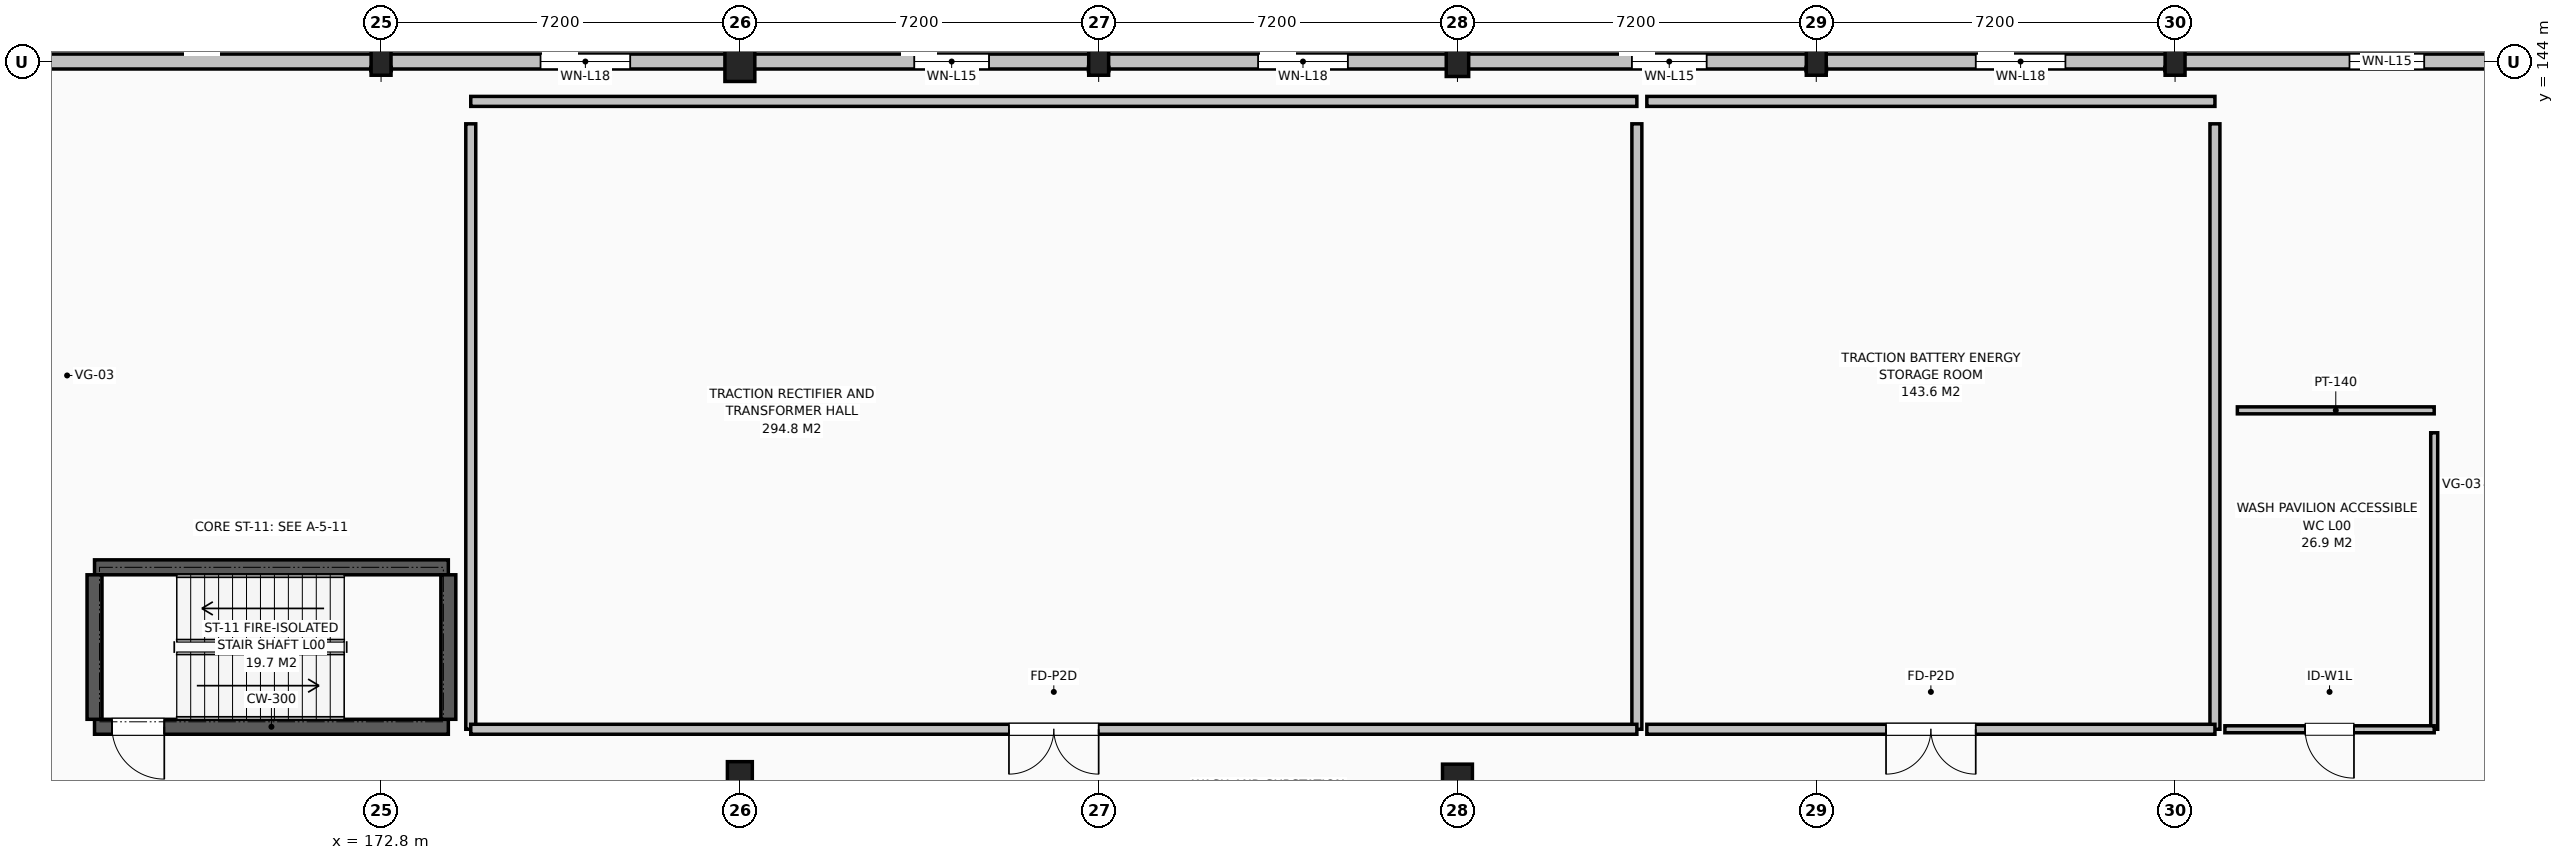
"""IFC4 building model, lengths in metres.
Left out: names, types, materials, properties, quantities, classifications, styles, units other than length and angle.
Written with IfcOpenShell. Run it as: python <this file> out.ifc"""

import sys

from ifc_helpers import new_model, si_unit, direction, frame, frame_2d, origin, origin_2d, place, context, subcontext, project, spatial, rectangle, circle, extrude, element, fill, save


model = new_model("IFC4")
c1 = context("Model", 3, precision=1e-05, world=origin(), true_north=direction((0.0, 1.0)))
c2 = subcontext(c1, "Body", "Model", "MODEL_VIEW")
j1 = project(units=[si_unit("LENGTHUNIT", "METRE"), si_unit("PLANEANGLEUNIT", "RADIAN")], contexts=[c1])
p1 = place(None, origin())
s1 = spatial("IfcSite", under=j1, at=p1, CompositionType="ELEMENT")
p2 = place(p1, origin())
s2 = spatial("IfcBuilding", under=s1, at=p2, CompositionType="ELEMENT")
p3 = place(p2, origin())
s3 = spatial("IfcBuildingStorey", under=s2, at=p3, CompositionType="ELEMENT", Elevation=0.0)
p4 = place(p3, frame((180.0, 129.6, 0.0), z_axis=(0.0, 0.0, 1.0), x_axis=(1.0, 0.0, 0.0)))
e1 = element("IfcColumn", 1, at=p4, inside=s3, PredefinedType="COLUMN", context=c2, shape_type="SweptSolid", body=[
    extrude(rectangle(XDim=0.5, YDim=0.7, at=origin_2d()), origin(), (0.0, 0.0, 1.0), 4.8),
])
p5 = place(p3, frame((180.0, 144.0, 0.0), z_axis=(0.0, 0.0, 1.0), x_axis=(1.0, 0.0, 0.0)))
e2 = element("IfcColumn", 2, at=p5, inside=s3, PredefinedType="COLUMN", context=c2, shape_type="SweptSolid", body=[
    extrude(rectangle(XDim=0.6, YDim=0.8, at=origin_2d()), origin(), (0.0, 0.0, 1.0), 4.8),
])
p6 = place(p3, frame((194.4, 129.6, 0.0), z_axis=(0.0, 0.0, 1.0), x_axis=(1.0, 0.0, 0.0)))
e3 = element("IfcColumn", 3, at=p6, inside=s3, PredefinedType="COLUMN", context=c2, shape_type="SweptSolid", body=[
    extrude(circle(Radius=0.3, at=origin_2d()), origin(), (0.0, 0.0, 1.0), 4.8),
])
p7 = place(p3, frame((194.4, 144.0, 0.0), z_axis=(0.0, 0.0, 1.0), x_axis=(1.0, 0.0, 0.0)))
e4 = element("IfcColumn", 4, at=p7, inside=s3, PredefinedType="COLUMN", context=c2, shape_type="SweptSolid", body=[
    extrude(rectangle(XDim=0.45, YDim=0.6, at=origin_2d()), origin(), (0.0, 0.0, 1.0), 4.8),
])
for number, where, z_axis, x_axis in (
    (5, (172.8, 144.0, 0.0), (0.0, 0.0, 1.0), (1.0, 0.0, 0.0)),
    (6, (187.2, 144.0, 0.0), (0.0, 0.0, 1.0), (1.0, 0.0, 0.0)),
    (7, (201.6, 144.0, 0.0), (0.0, 0.0, 1.0), (1.0, 0.0, 0.0)),
    (8, (208.8, 144.0, 0.0), (0.0, 0.0, 1.0), (1.0, 0.0, 0.0)),
):
    element("IfcColumn", number, at=place(p3, frame(where, z_axis=z_axis, x_axis=x_axis)), inside=s3, PredefinedType="PILASTER", context=c2, shape_type="SweptSolid", body=[
        extrude(rectangle(XDim=0.4, YDim=0.55, at=origin_2d()), origin(), (0.0, 0.0, 1.0), 4.4),
    ])
p8 = place(p3, frame((216.0, 144.0, 0.0), z_axis=(0.0, 0.0, 1.0), x_axis=(-1.0, 0.0, 0.0)))
e9 = element("IfcWall", 9, at=p8, inside=s3, PredefinedType="SOLIDWALL", context=c2, shape_type="SweptSolid", body=[
    extrude(rectangle(XDim=50.4, YDim=0.3, at=frame_2d((25.2, 0.0))), origin(), (0.0, 0.0, 1.0), 4.25),
])
p9 = place(p8, frame((2.2, 0.0, 1.4)))
e10 = element("IfcOpeningElement", 10, at=p9, cuts=e9, PredefinedType="OPENING", context=c2, shape_type="SweptSolid", body=[
    extrude(rectangle(XDim=1.5, YDim=1.15, at=frame_2d((0.75, 0.575))), frame((0.0, 0.16, 0.0), z_axis=(0.0, -1.0, 0.0), x_axis=(1.0, 0.0, 0.0)), (0.0, 0.0, 1.0), 0.32),
])
p10 = place(p8, frame((9.4, 0.0, 1.4)))
e11 = element("IfcOpeningElement", 11, at=p10, cuts=e9, PredefinedType="OPENING", context=c2, shape_type="SweptSolid", body=[
    extrude(rectangle(XDim=1.8, YDim=1.15, at=frame_2d((0.9, 0.575))), frame((0.0, 0.16, 0.0), z_axis=(0.0, -1.0, 0.0), x_axis=(1.0, 0.0, 0.0)), (0.0, 0.0, 1.0), 0.32),
])
p11 = place(p8, frame((16.6, 0.0, 1.4)))
e12 = element("IfcOpeningElement", 12, at=p11, cuts=e9, PredefinedType="OPENING", context=c2, shape_type="SweptSolid", body=[
    extrude(rectangle(XDim=1.5, YDim=1.15, at=frame_2d((0.75, 0.575))), frame((0.0, 0.16, 0.0), z_axis=(0.0, -1.0, 0.0), x_axis=(1.0, 0.0, 0.0)), (0.0, 0.0, 1.0), 0.32),
])
p12 = place(p8, frame((23.8, 0.0, 1.4)))
e13 = element("IfcOpeningElement", 13, at=p12, cuts=e9, PredefinedType="OPENING", context=c2, shape_type="SweptSolid", body=[
    extrude(rectangle(XDim=1.8, YDim=1.15, at=frame_2d((0.9, 0.575))), frame((0.0, 0.16, 0.0), z_axis=(0.0, -1.0, 0.0), x_axis=(1.0, 0.0, 0.0)), (0.0, 0.0, 1.0), 0.32),
])
p13 = place(p8, frame((31.0, 0.0, 1.4)))
e14 = element("IfcOpeningElement", 14, at=p13, cuts=e9, PredefinedType="OPENING", context=c2, shape_type="SweptSolid", body=[
    extrude(rectangle(XDim=1.5, YDim=1.15, at=frame_2d((0.75, 0.575))), frame((0.0, 0.16, 0.0), z_axis=(0.0, -1.0, 0.0), x_axis=(1.0, 0.0, 0.0)), (0.0, 0.0, 1.0), 0.32),
])
p14 = place(p8, frame((38.2, 0.0, 1.4)))
e15 = element("IfcOpeningElement", 15, at=p14, cuts=e9, PredefinedType="OPENING", context=c2, shape_type="SweptSolid", body=[
    extrude(rectangle(XDim=1.8, YDim=1.15, at=frame_2d((0.9, 0.575))), frame((0.0, 0.16, 0.0), z_axis=(0.0, -1.0, 0.0), x_axis=(1.0, 0.0, 0.0)), (0.0, 0.0, 1.0), 0.32),
])
p15 = place(p3, frame((167.05, 130.65, 0.0), z_axis=(0.0, 0.0, 1.0), x_axis=(1.0, 0.0, 0.0)))
e16 = element("IfcWall", 16, at=p15, inside=s3, PredefinedType="SHEAR", context=c2, shape_type="SweptSolid", body=[
    extrude(rectangle(XDim=7.1, YDim=0.3, at=frame_2d((3.55, 0.0))), origin(), (0.0, 0.0, 1.0), 4.525),
])
p16 = place(p15, frame((0.35, 0.0, 0.0)))
e17 = element("IfcOpeningElement", 17, at=p16, cuts=e16, PredefinedType="OPENING", context=c2, shape_type="SweptSolid", body=[
    extrude(rectangle(XDim=1.05, YDim=2.15, at=frame_2d((0.525, 1.075))), frame((0.0, 0.16, 0.0), z_axis=(0.0, -1.0, 0.0), x_axis=(1.0, 0.0, 0.0)), (0.0, 0.0, 1.0), 0.32),
])
p17 = place(p3, frame((174.15, 133.85, 0.0), z_axis=(0.0, 0.0, 1.0), x_axis=(-1.0, 0.0, 0.0)))
e18 = element("IfcWall", 18, at=p17, inside=s3, PredefinedType="SHEAR", context=c2, shape_type="SweptSolid", body=[
    extrude(rectangle(XDim=7.1, YDim=0.3, at=frame_2d((3.55, 0.0))), origin(), (0.0, 0.0, 1.0), 4.525),
])
for number, where, z_axis, x_axis in (
    (19, (174.15, 130.8, 0.0), (0.0, 0.0, 1.0), (0.0, 1.0, 0.0)),
    (20, (167.05, 133.7, 0.0), (0.0, 0.0, 1.0), (0.0, -1.0, 0.0)),
):
    element("IfcWall", number, at=place(p3, frame(where, z_axis=z_axis, x_axis=x_axis)), inside=s3, PredefinedType="SHEAR", context=c2, shape_type="SweptSolid", body=[
        extrude(rectangle(XDim=2.9, YDim=0.3, at=frame_2d((1.45, 0.0))), origin(), (0.0, 0.0, 1.0), 4.525),
    ])
p18 = place(p3, frame((174.6, 143.2, 0.0), z_axis=(0.0, 0.0, 1.0), x_axis=(1.0, 0.0, 0.0)))
e21 = element("IfcWall", 21, at=p18, inside=s3, PredefinedType="SOLIDWALL", context=c2, shape_type="SweptSolid", body=[
    extrude(rectangle(XDim=23.4, YDim=0.2, at=frame_2d((11.7, 0.0))), origin(), (0.0, 0.0, 1.0), 3.896),
])
for number, where, z_axis, x_axis in (
    (22, (198.0, 130.6, 0.0), (0.0, 0.0, 1.0), (0.0, 1.0, 0.0)),
    (23, (174.6, 142.75, 0.0), (0.0, 0.0, 1.0), (0.0, -1.0, 0.0)),
):
    element("IfcWall", number, at=place(p3, frame(where, z_axis=z_axis, x_axis=x_axis)), inside=s3, PredefinedType="SOLIDWALL", context=c2, shape_type="SweptSolid", body=[
        extrude(rectangle(XDim=12.15, YDim=0.2, at=frame_2d((6.075, 0.0))), origin(), (0.0, 0.0, 1.0), 4.1),
    ])
p19 = place(p3, frame((198.0, 130.6, 0.0), z_axis=(0.0, 0.0, 1.0), x_axis=(-1.0, 0.0, 0.0)))
e24 = element("IfcWall", 24, at=p19, inside=s3, PredefinedType="SOLIDWALL", context=c2, shape_type="SweptSolid", body=[
    extrude(rectangle(XDim=23.4, YDim=0.2, at=frame_2d((11.7, 0.0))), origin(), (0.0, 0.0, 1.0), 3.896),
])
p20 = place(p19, frame((10.8, 0.0, 0.0)))
e25 = element("IfcOpeningElement", 25, at=p20, cuts=e24, PredefinedType="OPENING", context=c2, shape_type="SweptSolid", body=[
    extrude(rectangle(XDim=1.8, YDim=2.2, at=frame_2d((0.9, 1.1))), frame((0.0, 0.11, 0.0), z_axis=(0.0, -1.0, 0.0), x_axis=(1.0, 0.0, 0.0)), (0.0, 0.0, 1.0), 0.22),
])
p21 = place(p3, frame((198.2, 143.2, 0.0), z_axis=(0.0, 0.0, 1.0), x_axis=(1.0, 0.0, 0.0)))
e26 = element("IfcWall", 26, at=p21, inside=s3, PredefinedType="SOLIDWALL", context=c2, shape_type="SweptSolid", body=[
    extrude(rectangle(XDim=11.4, YDim=0.2, at=frame_2d((5.7, 0.0))), origin(), (0.0, 0.0, 1.0), 4.1),
])
p22 = place(p3, frame((209.6, 130.6, 0.0), z_axis=(0.0, 0.0, 1.0), x_axis=(0.0, 1.0, 0.0)))
e27 = element("IfcWall", 27, at=p22, inside=s3, PredefinedType="SOLIDWALL", context=c2, shape_type="SweptSolid", body=[
    extrude(rectangle(XDim=12.15, YDim=0.2, at=frame_2d((6.075, 0.0))), origin(), (0.0, 0.0, 1.0), 4.1),
])
p23 = place(p3, frame((209.6, 130.6, 0.0), z_axis=(0.0, 0.0, 1.0), x_axis=(-1.0, 0.0, 0.0)))
e28 = element("IfcWall", 28, at=p23, inside=s3, PredefinedType="SOLIDWALL", context=c2, shape_type="SweptSolid", body=[
    extrude(rectangle(XDim=11.4, YDim=0.2, at=frame_2d((5.7, 0.0))), origin(), (0.0, 0.0, 1.0), 4.1),
])
p24 = place(p23, frame((4.8, 0.0, 0.0)))
e29 = element("IfcOpeningElement", 29, at=p24, cuts=e28, PredefinedType="OPENING", context=c2, shape_type="SweptSolid", body=[
    extrude(rectangle(XDim=1.8, YDim=2.2, at=frame_2d((0.9, 1.1))), frame((0.0, 0.11, 0.0), z_axis=(0.0, -1.0, 0.0), x_axis=(1.0, 0.0, 0.0)), (0.0, 0.0, 1.0), 0.22),
])
p25 = place(p3, frame((210.05, 137.0, 0.0), z_axis=(0.0, 0.0, 1.0), x_axis=(1.0, 0.0, 0.0)))
e30 = element("IfcWall", 30, at=p25, inside=s3, PredefinedType="PARTITIONING", context=c2, shape_type="SweptSolid", body=[
    extrude(rectangle(XDim=3.95, YDim=0.14, at=frame_2d((1.975, 0.0))), origin(), (0.0, 0.0, 1.0), 3.6),
])
p26 = place(p3, frame((214.0, 130.6, 0.0), z_axis=(0.0, 0.0, 1.0), x_axis=(0.0, 1.0, 0.0)))
e31 = element("IfcWall", 31, at=p26, inside=s3, PredefinedType="PARTITIONING", context=c2, shape_type="SweptSolid", body=[
    extrude(rectangle(XDim=5.95, YDim=0.14, at=frame_2d((2.975, 0.0))), origin(), (0.0, 0.0, 1.0), 3.6),
])
p27 = place(p3, frame((214.0, 130.6, 0.0), z_axis=(0.0, 0.0, 1.0), x_axis=(-1.0, 0.0, 0.0)))
e32 = element("IfcWall", 32, at=p27, inside=s3, PredefinedType="PARTITIONING", context=c2, shape_type="SweptSolid", body=[
    extrude(rectangle(XDim=4.2, YDim=0.14, at=frame_2d((2.1, 0.0))), origin(), (0.0, 0.0, 1.0), 3.6),
])
p28 = place(p27, frame((1.61, 0.0, 0.0)))
e33 = element("IfcOpeningElement", 33, at=p28, cuts=e32, PredefinedType="OPENING", context=c2, shape_type="SweptSolid", body=[
    extrude(rectangle(XDim=0.98, YDim=2.15, at=frame_2d((0.49, 1.075))), frame((0.0, 0.08, 0.0), z_axis=(0.0, -1.0, 0.0), x_axis=(1.0, 0.0, 0.0)), (0.0, 0.0, 1.0), 0.16),
])
p29 = place(p9, origin())
e34 = element("IfcWindow", 34, at=p29, inside=s3, PartitioningType="SINGLE_PANEL", PredefinedType="WINDOW", context=c2, shape_type="SweptSolid", body=[
    extrude(rectangle(XDim=1.5, YDim=1.15, at=frame_2d((0.75, 0.575))), frame((0.0, 0.03, 0.0), z_axis=(0.0, -1.0, 0.0), x_axis=(1.0, 0.0, 0.0)), (0.0, 0.0, 1.0), 0.06),
])
fill(e10, e34)
p30 = place(p10, origin())
e35 = element("IfcWindow", 35, at=p30, inside=s3, PartitioningType="SINGLE_PANEL", PredefinedType="WINDOW", context=c2, shape_type="SweptSolid", body=[
    extrude(rectangle(XDim=1.8, YDim=1.15, at=frame_2d((0.9, 0.575))), frame((0.0, 0.03, 0.0), z_axis=(0.0, -1.0, 0.0), x_axis=(1.0, 0.0, 0.0)), (0.0, 0.0, 1.0), 0.06),
])
fill(e11, e35)
p31 = place(p11, origin())
e36 = element("IfcWindow", 36, at=p31, inside=s3, PartitioningType="SINGLE_PANEL", PredefinedType="WINDOW", context=c2, shape_type="SweptSolid", body=[
    extrude(rectangle(XDim=1.5, YDim=1.15, at=frame_2d((0.75, 0.575))), frame((0.0, 0.03, 0.0), z_axis=(0.0, -1.0, 0.0), x_axis=(1.0, 0.0, 0.0)), (0.0, 0.0, 1.0), 0.06),
])
fill(e12, e36)
p32 = place(p12, origin())
e37 = element("IfcWindow", 37, at=p32, inside=s3, PartitioningType="SINGLE_PANEL", PredefinedType="WINDOW", context=c2, shape_type="SweptSolid", body=[
    extrude(rectangle(XDim=1.8, YDim=1.15, at=frame_2d((0.9, 0.575))), frame((0.0, 0.03, 0.0), z_axis=(0.0, -1.0, 0.0), x_axis=(1.0, 0.0, 0.0)), (0.0, 0.0, 1.0), 0.06),
])
fill(e13, e37)
p33 = place(p13, origin())
e38 = element("IfcWindow", 38, at=p33, inside=s3, PartitioningType="SINGLE_PANEL", PredefinedType="WINDOW", context=c2, shape_type="SweptSolid", body=[
    extrude(rectangle(XDim=1.5, YDim=1.15, at=frame_2d((0.75, 0.575))), frame((0.0, 0.03, 0.0), z_axis=(0.0, -1.0, 0.0), x_axis=(1.0, 0.0, 0.0)), (0.0, 0.0, 1.0), 0.06),
])
fill(e14, e38)
p34 = place(p14, origin())
e39 = element("IfcWindow", 39, at=p34, inside=s3, PartitioningType="SINGLE_PANEL", PredefinedType="WINDOW", context=c2, shape_type="SweptSolid", body=[
    extrude(rectangle(XDim=1.8, YDim=1.15, at=frame_2d((0.9, 0.575))), frame((0.0, 0.03, 0.0), z_axis=(0.0, -1.0, 0.0), x_axis=(1.0, 0.0, 0.0)), (0.0, 0.0, 1.0), 0.06),
])
fill(e15, e39)
p35 = place(p16, frame((1.05, 0.0, 0.0), z_axis=(0.0, 0.0, 1.0), x_axis=(-1.0, 0.0, 0.0)))
e40 = element("IfcDoor", 40, at=p35, inside=s3, OperationType="SINGLE_SWING_LEFT", PredefinedType="DOOR", context=c2, shape_type="SweptSolid", body=[
    extrude(rectangle(XDim=1.05, YDim=2.15, at=frame_2d((0.525, 1.075))), frame((0.0, 0.025, 0.0), z_axis=(0.0, -1.0, 0.0), x_axis=(1.0, 0.0, 0.0)), (0.0, 0.0, 1.0), 0.05),
])
fill(e17, e40)
p36 = place(p20, origin())
e41 = element("IfcDoor", 41, at=p36, inside=s3, OperationType="DOUBLE_SWING_LEFT", PredefinedType="DOOR", context=c2, shape_type="SweptSolid", body=[
    extrude(rectangle(XDim=1.8, YDim=2.2, at=frame_2d((0.9, 1.1))), frame((0.0, 0.025, 0.0), z_axis=(0.0, -1.0, 0.0), x_axis=(1.0, 0.0, 0.0)), (0.0, 0.0, 1.0), 0.05),
])
fill(e25, e41)
p37 = place(p24, origin())
e42 = element("IfcDoor", 42, at=p37, inside=s3, OperationType="DOUBLE_SWING_LEFT", PredefinedType="DOOR", context=c2, shape_type="SweptSolid", body=[
    extrude(rectangle(XDim=1.8, YDim=2.2, at=frame_2d((0.9, 1.1))), frame((0.0, 0.025, 0.0), z_axis=(0.0, -1.0, 0.0), x_axis=(1.0, 0.0, 0.0)), (0.0, 0.0, 1.0), 0.05),
])
fill(e29, e42)
p38 = place(p28, origin())
e43 = element("IfcDoor", 43, at=p38, inside=s3, OperationType="SINGLE_SWING_LEFT", PredefinedType="DOOR", context=c2, shape_type="SweptSolid", body=[
    extrude(rectangle(XDim=0.98, YDim=2.15, at=frame_2d((0.49, 1.075))), frame((0.0, 0.025, 0.0), z_axis=(0.0, -1.0, 0.0), x_axis=(1.0, 0.0, 0.0)), (0.0, 0.0, 1.0), 0.05),
])
fill(e33, e43)
save(model, sys.argv[1])
